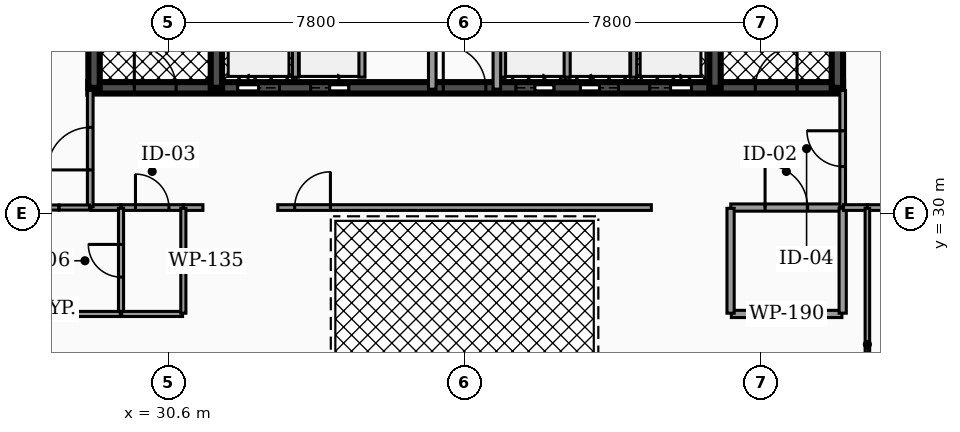
"""IFC4 building model, lengths in metres.
Left out: names, types, materials, properties, quantities, classifications, styles, units other than length and angle.
Written with IfcOpenShell. Run it as: python <this file> out.ifc"""

import sys

from ifc_helpers import new_model, si_unit, direction, frame, frame_2d, origin, place, context, subcontext, project, spatial, rectangle, extrude, element, fill, save


model = new_model("IFC4")
c1 = context("Model", 3, precision=1e-05, world=origin(), true_north=direction((0.0, 1.0)))
c2 = subcontext(c1, "Body", "Model", "MODEL_VIEW")
j1 = project(units=[si_unit("LENGTHUNIT", "METRE"), si_unit("PLANEANGLEUNIT", "RADIAN")], contexts=[c1])
p1 = place(None, origin())
s1 = spatial("IfcSite", under=j1, at=p1, CompositionType="ELEMENT")
p2 = place(p1, origin())
s2 = spatial("IfcBuilding", under=s1, at=p2, CompositionType="ELEMENT")
p3 = place(p2, frame((0.0, 0.0, 199.92)))
s3 = spatial("IfcBuildingStorey", under=s2, at=p3, CompositionType="ELEMENT", Elevation=199.92)
p4 = place(p3, frame((28.5, 33.3, 0.0), z_axis=(0.0, 0.0, 1.0), x_axis=(1.0, 0.0, 0.0)))
e1 = element("IfcWall", 1, at=p4, inside=s3, PredefinedType="SHEAR", context=c2, shape_type="SweptSolid", body=[
    extrude(rectangle(XDim=19.86, YDim=0.3, at=frame_2d((9.93, 0.0))), origin(), (0.0, 0.0, 1.0), 4.12),
])
p5 = place(p4, frame((3.93, 0.0, 0.0)))
e2 = element("IfcOpeningElement", 2, at=p5, cuts=e1, PredefinedType="OPENING", context=c2, shape_type="SweptSolid", body=[
    extrude(rectangle(XDim=1.1, YDim=2.15, at=frame_2d((0.55, 1.075))), frame((0.0, 0.16, 0.0), z_axis=(0.0, -1.0, 0.0), x_axis=(1.0, 0.0, 0.0)), (0.0, 0.0, 1.0), 0.32),
])
p6 = place(p4, frame((14.77, 0.0, 0.0)))
e3 = element("IfcOpeningElement", 3, at=p6, cuts=e1, PredefinedType="OPENING", context=c2, shape_type="SweptSolid", body=[
    extrude(rectangle(XDim=1.1, YDim=2.15, at=frame_2d((0.55, 1.075))), frame((0.0, 0.16, 0.0), z_axis=(0.0, -1.0, 0.0), x_axis=(1.0, 0.0, 0.0)), (0.0, 0.0, 1.0), 0.32),
])
p7 = place(p4, frame((11.25, 0.0, 0.0)))
e4 = element("IfcOpeningElement", 4, at=p7, cuts=e1, PredefinedType="OPENING", context=c2, shape_type="SweptSolid", body=[
    extrude(rectangle(XDim=1.0, YDim=2.1, at=frame_2d((0.5, 1.05))), frame((0.0, 0.16, 0.0), z_axis=(0.0, -1.0, 0.0), x_axis=(1.0, 0.0, 0.0)), (0.0, 0.0, 1.0), 0.32),
])
p8 = place(p4, frame((12.95, 0.0, 0.0)))
e5 = element("IfcOpeningElement", 5, at=p8, cuts=e1, PredefinedType="OPENING", context=c2, shape_type="SweptSolid", body=[
    extrude(rectangle(XDim=1.0, YDim=2.1, at=frame_2d((0.5, 1.05))), frame((0.0, 0.16, 0.0), z_axis=(0.0, -1.0, 0.0), x_axis=(1.0, 0.0, 0.0)), (0.0, 0.0, 1.0), 0.32),
])
p9 = place(p4, frame((5.85, 0.0, 0.0)))
e6 = element("IfcOpeningElement", 6, at=p9, cuts=e1, PredefinedType="OPENING", context=c2, shape_type="SweptSolid", body=[
    extrude(rectangle(XDim=1.0, YDim=2.1, at=frame_2d((0.5, 1.05))), frame((0.0, 0.16, 0.0), z_axis=(0.0, -1.0, 0.0), x_axis=(1.0, 0.0, 0.0)), (0.0, 0.0, 1.0), 0.32),
])
p10 = place(p4, frame((1.21, 0.0, 0.0)))
e7 = element("IfcOpeningElement", 7, at=p10, cuts=e1, PredefinedType="OPENING", context=c2, shape_type="SweptSolid", body=[
    extrude(rectangle(XDim=1.1, YDim=2.2, at=frame_2d((0.55, 1.1))), frame((0.0, 0.16, 0.0), z_axis=(0.0, -1.0, 0.0), x_axis=(1.0, 0.0, 0.0)), (0.0, 0.0, 1.0), 0.32),
])
p11 = place(p4, frame((9.34, 0.0, 0.0)))
e8 = element("IfcOpeningElement", 8, at=p11, cuts=e1, PredefinedType="OPENING", context=c2, shape_type="SweptSolid", body=[
    extrude(rectangle(XDim=1.12, YDim=2.05, at=frame_2d((0.56, 1.025))), frame((0.0, 0.16, 0.0), z_axis=(0.0, -1.0, 0.0), x_axis=(1.0, 0.0, 0.0)), (0.0, 0.0, 1.0), 0.32),
])
p12 = place(p4, frame((17.55, 0.0, 0.0)))
e9 = element("IfcOpeningElement", 9, at=p12, cuts=e1, PredefinedType="OPENING", context=c2, shape_type="SweptSolid", body=[
    extrude(rectangle(XDim=1.1, YDim=2.2, at=frame_2d((0.55, 1.1))), frame((0.0, 0.16, 0.0), z_axis=(0.0, -1.0, 0.0), x_axis=(1.0, 0.0, 0.0)), (0.0, 0.0, 1.0), 0.32),
])
for number, where, z_axis, x_axis in (
    (10, (28.65, 33.3, 0.0), (0.0, 0.0, 1.0), (0.0, 1.0, 0.0)),
    (11, (31.87, 33.3, 0.0), (0.0, 0.0, 1.0), (0.0, 1.0, 0.0)),
    (12, (44.99, 33.3, 0.0), (0.0, 0.0, 1.0), (0.0, 1.0, 0.0)),
    (13, (48.21, 33.3, 0.0), (0.0, 0.0, 1.0), (0.0, 1.0, 0.0)),
):
    element("IfcWall", number, at=place(p3, frame(where, z_axis=z_axis, x_axis=x_axis)), inside=s3, PredefinedType="SHEAR", context=c2, shape_type="SweptSolid", body=[
        extrude(rectangle(XDim=10.1, YDim=0.3, at=frame_2d((5.05, 0.0))), origin(), (0.0, 0.0, 1.0), 4.12),
    ])
for number, where, z_axis, x_axis in (
    (14, (33.95, 33.58, 0.0), (0.0, 0.0, 1.0), (0.0, 1.0, 0.0)),
    (15, (42.85, 33.58, 0.0), (0.0, 0.0, 1.0), (0.0, 1.0, 0.0)),
):
    element("IfcWall", number, at=place(p3, frame(where, z_axis=z_axis, x_axis=x_axis)), inside=s3, PredefinedType="SOLIDWALL", context=c2, shape_type="SweptSolid", body=[
        extrude(rectangle(XDim=2.45, YDim=0.16, at=frame_2d((1.225, 0.0))), origin(), (0.0, 0.0, 1.0), 3.092),
    ])
for number, where, z_axis, x_axis in (
    (16, (39.4, 33.58, 0.0), (0.0, 0.0, 1.0), (0.0, 1.0, 0.0)),
    (17, (41.1, 33.58, 0.0), (0.0, 0.0, 1.0), (0.0, 1.0, 0.0)),
    (18, (35.7, 33.58, 0.0), (0.0, 0.0, 1.0), (0.0, 1.0, 0.0)),
):
    element("IfcWall", number, at=place(p3, frame(where, z_axis=z_axis, x_axis=x_axis)), inside=s3, PredefinedType="SOLIDWALL", context=c2, shape_type="SweptSolid", body=[
        extrude(rectangle(XDim=2.25, YDim=0.16, at=frame_2d((1.125, 0.0))), origin(), (0.0, 0.0, 1.0), 3.092),
    ])
p13 = place(p3, frame((37.55, 33.265, 0.0), z_axis=(0.0, 0.0, 1.0), x_axis=(0.0, 1.0, 0.0)))
e19 = element("IfcWall", 19, at=p13, inside=s3, PredefinedType="PARTITIONING", context=c2, shape_type="SweptSolid", body=[
    extrude(rectangle(XDim=3.615, YDim=0.2, at=frame_2d((1.808, 0.0))), origin(), (0.0, 0.0, 1.0), 3.077),
])
p14 = place(p13, frame((1.367, 0.0, 0.0)))
e20 = element("IfcOpeningElement", 20, at=p14, cuts=e19, PredefinedType="OPENING", context=c2, shape_type="SweptSolid", body=[
    extrude(rectangle(XDim=0.88, YDim=2.05, at=frame_2d((0.44, 1.025))), frame((0.0, 0.11, 0.0), z_axis=(0.0, -1.0, 0.0), x_axis=(1.0, 0.0, 0.0)), (0.0, 0.0, 1.0), 0.22),
])
p15 = place(p3, frame((39.25, 33.265, 0.0), z_axis=(0.0, 0.0, 1.0), x_axis=(0.0, 1.0, 0.0)))
e21 = element("IfcWall", 21, at=p15, inside=s3, PredefinedType="PARTITIONING", context=c2, shape_type="SweptSolid", body=[
    extrude(rectangle(XDim=3.615, YDim=0.2, at=frame_2d((1.808, 0.0))), origin(), (0.0, 0.0, 1.0), 3.077),
])
p16 = place(p3, frame((45.405, 30.15, 0.0), z_axis=(0.0, 0.0, 1.0), x_axis=(1.0, 0.0, 0.0)))
e22 = element("IfcWall", 22, at=p16, inside=s3, PredefinedType="PARTITIONING", context=c2, shape_type="SweptSolid", body=[
    extrude(rectangle(XDim=2.925, YDim=0.19, at=frame_2d((1.462, 0.0))), origin(), (0.0, 0.0, 1.0), 3.077),
])
p17 = place(p16, frame((0.903, 0.0, 0.0)))
e23 = element("IfcOpeningElement", 23, at=p17, cuts=e22, PredefinedType="OPENING", context=c2, shape_type="SweptSolid", body=[
    extrude(rectangle(XDim=1.12, YDim=2.05, at=frame_2d((0.56, 1.025))), frame((0.0, 0.105, 0.0), z_axis=(0.0, -1.0, 0.0), x_axis=(1.0, 0.0, 0.0)), (0.0, 0.0, 1.0), 0.21),
])
p18 = place(p3, frame((48.35, 30.17, 0.0), z_axis=(0.0, 0.0, 1.0), x_axis=(0.0, 1.0, 0.0)))
e24 = element("IfcWall", 24, at=p18, inside=s3, PredefinedType="PARTITIONING", context=c2, shape_type="SweptSolid", body=[
    extrude(rectangle(XDim=3.06, YDim=0.15, at=frame_2d((1.53, 0.0))), origin(), (0.0, 0.0, 1.0), 3.077),
])
p19 = place(p18, frame((1.06, 0.0, 0.0)))
e25 = element("IfcOpeningElement", 25, at=p19, cuts=e24, PredefinedType="OPENING", context=c2, shape_type="SweptSolid", body=[
    extrude(rectangle(XDim=0.94, YDim=2.05, at=frame_2d((0.47, 1.025))), frame((0.0, 0.085, 0.0), z_axis=(0.0, -1.0, 0.0), x_axis=(1.0, 0.0, 0.0)), (0.0, 0.0, 1.0), 0.17),
])
p20 = place(p3, frame((29.365, 30.15, 0.0), z_axis=(0.0, 0.0, 1.0), x_axis=(1.0, 0.0, 0.0)))
e26 = element("IfcWall", 26, at=p20, inside=s3, PredefinedType="PARTITIONING", context=c2, shape_type="SweptSolid", body=[
    extrude(rectangle(XDim=1.63, YDim=0.15, at=frame_2d((0.815, 0.0))), origin(), (0.0, 0.0, 1.0), 3.077),
])
p21 = place(p20, frame((0.375, 0.0, 0.0)))
e27 = element("IfcOpeningElement", 27, at=p21, cuts=e26, PredefinedType="OPENING", context=c2, shape_type="SweptSolid", body=[
    extrude(rectangle(XDim=0.88, YDim=2.05, at=frame_2d((0.44, 1.025))), frame((0.0, 0.085, 0.0), z_axis=(0.0, -1.0, 0.0), x_axis=(1.0, 0.0, 0.0)), (0.0, 0.0, 1.0), 0.17),
])
p22 = place(p3, frame((28.57, 30.15, 0.0), z_axis=(0.0, 0.0, 1.0), x_axis=(1.0, 0.0, 0.0)))
e28 = element("IfcWall", 28, at=p22, inside=s3, PredefinedType="PARTITIONING", context=c2, shape_type="SweptSolid", body=[
    extrude(rectangle(XDim=0.785, YDim=0.15, at=frame_2d((0.393, 0.0))), origin(), (0.0, 0.0, 1.0), 3.077),
])
p23 = place(p3, frame((33.485, 30.15, 0.0), z_axis=(0.0, 0.0, 1.0), x_axis=(1.0, 0.0, 0.0)))
e29 = element("IfcWall", 29, at=p23, inside=s3, PredefinedType="PARTITIONING", context=c2, shape_type="SweptSolid", body=[
    extrude(rectangle(XDim=9.83, YDim=0.15, at=frame_2d((4.915, 0.0))), origin(), (0.0, 0.0, 1.0), 3.077),
])
p24 = place(p23, frame((0.445, 0.0, 0.0)))
e30 = element("IfcOpeningElement", 30, at=p24, cuts=e29, PredefinedType="OPENING", context=c2, shape_type="SweptSolid", body=[
    extrude(rectangle(XDim=0.94, YDim=2.05, at=frame_2d((0.47, 1.025))), frame((0.0, 0.085, 0.0), z_axis=(0.0, -1.0, 0.0), x_axis=(1.0, 0.0, 0.0)), (0.0, 0.0, 1.0), 0.17),
])
p25 = place(p3, frame((31.005, 30.15, 0.0), z_axis=(0.0, 0.0, 1.0), x_axis=(1.0, 0.0, 0.0)))
e31 = element("IfcWall", 31, at=p25, inside=s3, PredefinedType="PARTITIONING", context=c2, shape_type="SweptSolid", body=[
    extrude(rectangle(XDim=0.51, YDim=0.15, at=frame_2d((0.255, 0.0))), origin(), (0.0, 0.0, 1.0), 3.077),
])
p26 = place(p3, frame((28.55, 30.17, 0.0), z_axis=(0.0, 0.0, 1.0), x_axis=(0.0, 1.0, 0.0)))
e32 = element("IfcWall", 32, at=p26, inside=s3, PredefinedType="PARTITIONING", context=c2, shape_type="SweptSolid", body=[
    extrude(rectangle(XDim=3.06, YDim=0.15, at=frame_2d((1.53, 0.0))), origin(), (0.0, 0.0, 1.0), 3.077),
])
p27 = place(p26, frame((0.97, 0.0, 0.0)))
e33 = element("IfcOpeningElement", 33, at=p27, cuts=e32, PredefinedType="OPENING", context=c2, shape_type="SweptSolid", body=[
    extrude(rectangle(XDim=1.12, YDim=2.05, at=frame_2d((0.56, 1.025))), frame((0.0, 0.085, 0.0), z_axis=(0.0, -1.0, 0.0), x_axis=(1.0, 0.0, 0.0)), (0.0, 0.0, 1.0), 0.17),
])
p28 = place(p3, frame((45.42, 27.35, 0.0), z_axis=(0.0, 0.0, 1.0), x_axis=(1.0, 0.0, 0.0)))
e34 = element("IfcWall", 34, at=p28, inside=s3, PredefinedType="PARTITIONING", context=c2, shape_type="SweptSolid", body=[
    extrude(rectangle(XDim=2.91, YDim=0.19, at=frame_2d((1.455, 0.0))), origin(), (0.0, 0.0, 1.0), 3.077),
])
for number, where, z_axis, x_axis in (
    (35, (45.4, 27.37, 0.0), (0.0, 0.0, 1.0), (0.0, 1.0, 0.0)),
    (36, (48.35, 27.37, 0.0), (0.0, 0.0, 1.0), (0.0, 1.0, 0.0)),
):
    element("IfcWall", number, at=place(p3, frame(where, z_axis=z_axis, x_axis=x_axis)), inside=s3, PredefinedType="PARTITIONING", context=c2, shape_type="SweptSolid", body=[
        extrude(rectangle(XDim=2.76, YDim=0.19, at=frame_2d((1.38, 0.0))), origin(), (0.0, 0.0, 1.0), 3.077),
    ])
p29 = place(p3, frame((48.37, 30.15, 0.0), z_axis=(0.0, 0.0, 1.0), x_axis=(1.0, 0.0, 0.0)))
e37 = element("IfcWall", 37, at=p29, inside=s3, PredefinedType="PARTITIONING", context=c2, shape_type="SweptSolid", body=[
    extrude(rectangle(XDim=0.625, YDim=0.15, at=frame_2d((0.312, 0.0))), origin(), (0.0, 0.0, 1.0), 3.077),
])
p30 = place(p3, frame((49.005, 30.15, 0.0), z_axis=(0.0, 0.0, 1.0), x_axis=(1.0, 0.0, 0.0)))
e38 = element("IfcWall", 38, at=p30, inside=s3, PredefinedType="PARTITIONING", context=c2, shape_type="SweptSolid", body=[
    extrude(rectangle(XDim=1.345, YDim=0.15, at=frame_2d((0.673, 0.0))), origin(), (0.0, 0.0, 1.0), 3.077),
])
p31 = place(p3, frame((29.36, 27.37, 0.0), z_axis=(0.0, 0.0, 1.0), x_axis=(0.0, 1.0, 0.0)))
e39 = element("IfcWall", 39, at=p31, inside=s3, PredefinedType="PARTITIONING", context=c2, shape_type="SweptSolid", body=[
    extrude(rectangle(XDim=2.76, YDim=0.135, at=frame_2d((1.38, 0.0))), origin(), (0.0, 0.0, 1.0), 3.077),
])
p32 = place(p31, frame((0.95, 0.0, 0.0)))
e40 = element("IfcOpeningElement", 40, at=p32, cuts=e39, PredefinedType="OPENING", context=c2, shape_type="SweptSolid", body=[
    extrude(rectangle(XDim=0.86, YDim=2.05, at=frame_2d((0.43, 1.025))), frame((0.0, 0.077, 0.0), z_axis=(0.0, -1.0, 0.0), x_axis=(1.0, 0.0, 0.0)), (0.0, 0.0, 1.0), 0.155),
])
p33 = place(p3, frame((29.38, 27.35, 0.0), z_axis=(0.0, 0.0, 1.0), x_axis=(1.0, 0.0, 0.0)))
e41 = element("IfcWall", 41, at=p33, inside=s3, PredefinedType="PARTITIONING", context=c2, shape_type="SweptSolid", body=[
    extrude(rectangle(XDim=1.6, YDim=0.135, at=frame_2d((0.8, 0.0))), origin(), (0.0, 0.0, 1.0), 3.077),
])
p34 = place(p3, frame((31.0, 27.37, 0.0), z_axis=(0.0, 0.0, 1.0), x_axis=(0.0, 1.0, 0.0)))
e42 = element("IfcWall", 42, at=p34, inside=s3, PredefinedType="PARTITIONING", context=c2, shape_type="SweptSolid", body=[
    extrude(rectangle(XDim=2.76, YDim=0.135, at=frame_2d((1.38, 0.0))), origin(), (0.0, 0.0, 1.0), 3.077),
])
p35 = place(p3, frame((27.73, 27.35, 0.0), z_axis=(0.0, 0.0, 1.0), x_axis=(1.0, 0.0, 0.0)))
e43 = element("IfcWall", 43, at=p35, inside=s3, PredefinedType="PARTITIONING", context=c2, shape_type="SweptSolid", body=[
    extrude(rectangle(XDim=1.61, YDim=0.135, at=frame_2d((0.805, 0.0))), origin(), (0.0, 0.0, 1.0), 3.077),
])
for number, where, z_axis, x_axis in (
    (44, (26.673, 27.35, 0.0), (0.0, 0.0, 1.0), (1.0, 0.0, 0.0)),
    (45, (26.673, 30.15, 0.0), (0.0, 0.0, 1.0), (1.0, 0.0, 0.0)),
):
    element("IfcWall", number, at=place(p3, frame(where, z_axis=z_axis, x_axis=x_axis)), inside=s3, PredefinedType="PARTITIONING", context=c2, shape_type="SweptSolid", body=[
        extrude(rectangle(XDim=1.057, YDim=0.135, at=frame_2d((0.529, 0.0))), origin(), (0.0, 0.0, 1.0), 3.077),
    ])
p36 = place(p3, frame((27.73, 30.15, 0.0), z_axis=(0.0, 0.0, 1.0), x_axis=(1.0, 0.0, 0.0)))
e46 = element("IfcWall", 46, at=p36, inside=s3, PredefinedType="PARTITIONING", context=c2, shape_type="SweptSolid", body=[
    extrude(rectangle(XDim=0.8, YDim=0.135, at=frame_2d((0.4, 0.0))), origin(), (0.0, 0.0, 1.0), 3.077),
])
p37 = place(p3, frame((49.0, 22.969, 0.0), z_axis=(0.0, 0.0, 1.0), x_axis=(0.0, 1.0, 0.0)))
e47 = element("IfcWall", 47, at=p37, inside=s3, PredefinedType="PARTITIONING", context=c2, shape_type="SweptSolid", body=[
    extrude(rectangle(XDim=7.161, YDim=0.12, at=frame_2d((3.58, 0.0))), origin(), (0.0, 0.0, 1.0), 3.077),
])
p38 = place(p5, origin())
e48 = element("IfcDoor", 48, at=p38, inside=s3, OperationType="SLIDING_TO_LEFT", PredefinedType="DOOR", context=c2, shape_type="SweptSolid", body=[
    extrude(rectangle(XDim=1.1, YDim=2.15, at=frame_2d((0.55, 1.075))), frame((0.0, 0.025, 0.0), z_axis=(0.0, -1.0, 0.0), x_axis=(1.0, 0.0, 0.0)), (0.0, 0.0, 1.0), 0.05),
])
fill(e2, e48)
p39 = place(p6, origin())
e49 = element("IfcDoor", 49, at=p39, inside=s3, OperationType="SLIDING_TO_RIGHT", PredefinedType="DOOR", context=c2, shape_type="SweptSolid", body=[
    extrude(rectangle(XDim=1.1, YDim=2.15, at=frame_2d((0.55, 1.075))), frame((0.0, 0.025, 0.0), z_axis=(0.0, -1.0, 0.0), x_axis=(1.0, 0.0, 0.0)), (0.0, 0.0, 1.0), 0.05),
])
fill(e3, e49)
p40 = place(p7, origin())
e50 = element("IfcDoor", 50, at=p40, inside=s3, OperationType="SLIDING_TO_RIGHT", PredefinedType="DOOR", context=c2, shape_type="SweptSolid", body=[
    extrude(rectangle(XDim=1.0, YDim=2.1, at=frame_2d((0.5, 1.05))), frame((0.0, 0.025, 0.0), z_axis=(0.0, -1.0, 0.0), x_axis=(1.0, 0.0, 0.0)), (0.0, 0.0, 1.0), 0.05),
])
fill(e4, e50)
p41 = place(p8, origin())
e51 = element("IfcDoor", 51, at=p41, inside=s3, OperationType="SLIDING_TO_LEFT", PredefinedType="DOOR", context=c2, shape_type="SweptSolid", body=[
    extrude(rectangle(XDim=1.0, YDim=2.1, at=frame_2d((0.5, 1.05))), frame((0.0, 0.025, 0.0), z_axis=(0.0, -1.0, 0.0), x_axis=(1.0, 0.0, 0.0)), (0.0, 0.0, 1.0), 0.05),
])
fill(e5, e51)
p42 = place(p9, origin())
e52 = element("IfcDoor", 52, at=p42, inside=s3, OperationType="SLIDING_TO_RIGHT", PredefinedType="DOOR", context=c2, shape_type="SweptSolid", body=[
    extrude(rectangle(XDim=1.0, YDim=2.1, at=frame_2d((0.5, 1.05))), frame((0.0, 0.025, 0.0), z_axis=(0.0, -1.0, 0.0), x_axis=(1.0, 0.0, 0.0)), (0.0, 0.0, 1.0), 0.05),
])
fill(e6, e52)
p43 = place(p10, origin())
e53 = element("IfcDoor", 53, at=p43, inside=s3, OperationType="SINGLE_SWING_LEFT", PredefinedType="DOOR", context=c2, shape_type="SweptSolid", body=[
    extrude(rectangle(XDim=1.1, YDim=2.2, at=frame_2d((0.55, 1.1))), frame((0.0, 0.025, 0.0), z_axis=(0.0, -1.0, 0.0), x_axis=(1.0, 0.0, 0.0)), (0.0, 0.0, 1.0), 0.05),
])
fill(e7, e53)
p44 = place(p11, origin())
e54 = element("IfcDoor", 54, at=p44, inside=s3, OperationType="SINGLE_SWING_LEFT", PredefinedType="DOOR", context=c2, shape_type="SweptSolid", body=[
    extrude(rectangle(XDim=1.12, YDim=2.05, at=frame_2d((0.56, 1.025))), frame((0.0, 0.025, 0.0), z_axis=(0.0, -1.0, 0.0), x_axis=(1.0, 0.0, 0.0)), (0.0, 0.0, 1.0), 0.05),
])
fill(e8, e54)
p45 = place(p12, origin())
e55 = element("IfcDoor", 55, at=p45, inside=s3, OperationType="SINGLE_SWING_RIGHT", PredefinedType="DOOR", context=c2, shape_type="SweptSolid", body=[
    extrude(rectangle(XDim=1.1, YDim=2.2, at=frame_2d((0.55, 1.1))), frame((0.0, 0.025, 0.0), z_axis=(0.0, -1.0, 0.0), x_axis=(1.0, 0.0, 0.0)), (0.0, 0.0, 1.0), 0.05),
])
fill(e9, e55)
p46 = place(p17, origin())
e56 = element("IfcDoor", 56, at=p46, inside=s3, OperationType="SINGLE_SWING_LEFT", PredefinedType="DOOR", context=c2, shape_type="SweptSolid", body=[
    extrude(rectangle(XDim=1.12, YDim=2.05, at=frame_2d((0.56, 1.025))), frame((0.0, 0.025, 0.0), z_axis=(0.0, -1.0, 0.0), x_axis=(1.0, 0.0, 0.0)), (0.0, 0.0, 1.0), 0.05),
])
fill(e23, e56)
p47 = place(p19, origin())
e57 = element("IfcDoor", 57, at=p47, inside=s3, OperationType="SINGLE_SWING_RIGHT", PredefinedType="DOOR", context=c2, shape_type="SweptSolid", body=[
    extrude(rectangle(XDim=0.94, YDim=2.05, at=frame_2d((0.47, 1.025))), frame((0.0, 0.025, 0.0), z_axis=(0.0, -1.0, 0.0), x_axis=(1.0, 0.0, 0.0)), (0.0, 0.0, 1.0), 0.05),
])
fill(e25, e57)
p48 = place(p21, origin())
e58 = element("IfcDoor", 58, at=p48, inside=s3, OperationType="SINGLE_SWING_LEFT", PredefinedType="DOOR", context=c2, shape_type="SweptSolid", body=[
    extrude(rectangle(XDim=0.88, YDim=2.05, at=frame_2d((0.44, 1.025))), frame((0.0, 0.025, 0.0), z_axis=(0.0, -1.0, 0.0), x_axis=(1.0, 0.0, 0.0)), (0.0, 0.0, 1.0), 0.05),
])
fill(e27, e58)
p49 = place(p24, origin())
e59 = element("IfcDoor", 59, at=p49, inside=s3, OperationType="SINGLE_SWING_RIGHT", PredefinedType="DOOR", context=c2, shape_type="SweptSolid", body=[
    extrude(rectangle(XDim=0.94, YDim=2.05, at=frame_2d((0.47, 1.025))), frame((0.0, 0.025, 0.0), z_axis=(0.0, -1.0, 0.0), x_axis=(1.0, 0.0, 0.0)), (0.0, 0.0, 1.0), 0.05),
])
fill(e30, e59)
p50 = place(p27, origin())
e60 = element("IfcDoor", 60, at=p50, inside=s3, OperationType="SINGLE_SWING_LEFT", PredefinedType="DOOR", context=c2, shape_type="SweptSolid", body=[
    extrude(rectangle(XDim=1.12, YDim=2.05, at=frame_2d((0.56, 1.025))), frame((0.0, 0.025, 0.0), z_axis=(0.0, -1.0, 0.0), x_axis=(1.0, 0.0, 0.0)), (0.0, 0.0, 1.0), 0.05),
])
fill(e33, e60)
p51 = place(p32, origin())
e61 = element("IfcDoor", 61, at=p51, inside=s3, OperationType="SINGLE_SWING_RIGHT", PredefinedType="DOOR", context=c2, shape_type="SweptSolid", body=[
    extrude(rectangle(XDim=0.86, YDim=2.05, at=frame_2d((0.43, 1.025))), frame((0.0, 0.025, 0.0), z_axis=(0.0, -1.0, 0.0), x_axis=(1.0, 0.0, 0.0)), (0.0, 0.0, 1.0), 0.05),
])
fill(e40, e61)
save(model, sys.argv[1])
